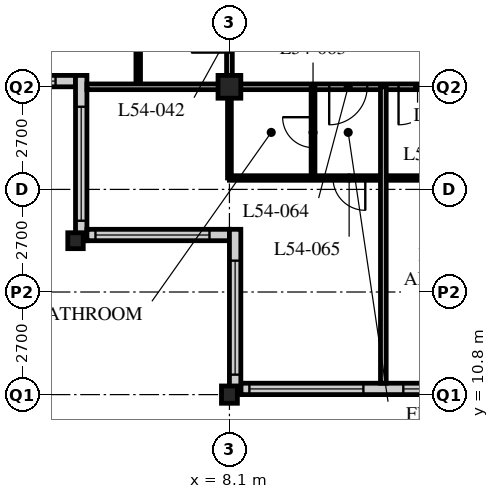
"""IFC4 building model, lengths in metres.
Left out: names, types, materials, properties, quantities, classifications, styles, units other than length and angle.
Written with IfcOpenShell. Run it as: python <this file> out.ifc"""

import sys

from ifc_helpers import new_model, si_unit, direction, frame, frame_2d, origin, origin_2d, place, context, subcontext, project, spatial, rectangle, hollow_rectangle, i_section, extrude, element, fill, save


model = new_model("IFC4")
c1 = context("Model", 3, precision=1e-05, world=origin(), true_north=direction((0.0, 1.0)))
c2 = subcontext(c1, "Body", "Model", "MODEL_VIEW")
j1 = project(units=[si_unit("LENGTHUNIT", "METRE"), si_unit("PLANEANGLEUNIT", "RADIAN")], contexts=[c1])
p1 = place(None, origin())
s1 = spatial("IfcSite", under=j1, at=p1, CompositionType="ELEMENT")
p2 = place(p1, origin())
s2 = spatial("IfcBuilding", under=s1, at=p2, CompositionType="ELEMENT")
p3 = place(p2, frame((0.0, 0.0, 210.0)))
s3 = spatial("IfcBuildingStorey", under=s2, at=p3, CompositionType="ELEMENT", Elevation=210.0)
p4 = place(p3, frame((4.05, 14.85, 0.0), z_axis=(0.0, 0.0, 1.0), x_axis=(1.0, 0.0, 0.0)))
e1 = element("IfcColumn", 1, at=p4, inside=s3, PredefinedType="COLUMN", context=c2, shape_type="SweptSolid", body=[
    extrude(i_section(OverallWidth=0.407, OverallDepth=0.419, WebThickness=0.031, FlangeThickness=0.049, FilletRadius=0.015, at=origin_2d()), origin(), (0.0, 0.0, 1.0), 3.6),
])
p5 = place(p3, frame((8.1, 10.8, 0.0), z_axis=(0.0, 0.0, 1.0), x_axis=(1.0, 0.0, 0.0)))
e2 = element("IfcColumn", 2, at=p5, inside=s3, PredefinedType="COLUMN", context=c2, shape_type="SweptSolid", body=[
    extrude(i_section(OverallWidth=0.418, OverallDepth=0.456, WebThickness=0.042, FlangeThickness=0.067, FilletRadius=0.015, at=origin_2d()), origin(), (0.0, 0.0, 1.0), 3.6),
])
p6 = place(p3, frame((8.1, 18.9, 0.0), z_axis=(0.0, 0.0, 1.0), x_axis=(1.0, 0.0, 0.0)))
e3 = element("IfcColumn", 3, at=p6, inside=s3, PredefinedType="COLUMN", context=c2, shape_type="SweptSolid", body=[
    extrude(hollow_rectangle(XDim=0.6, YDim=0.6, WallThickness=0.05, at=origin_2d()), origin(), (0.0, 0.0, 1.0), 3.6),
])
p7 = place(p3, frame((8.4, 10.95, 0.0), z_axis=(0.0, 0.0, 1.0), x_axis=(1.0, 0.0, 0.0)))
e4 = element("IfcWall", 4, at=p7, inside=s3, PredefinedType="SOLIDWALL", context=c2, shape_type="SweptSolid", body=[
    extrude(rectangle(XDim=40.2, YDim=0.3, at=frame_2d((20.1, 0.0))), origin(), (0.0, 0.0, 1.0), 3.39),
])
p8 = place(p7, frame((0.225, 0.0, 0.6)))
e5 = element("IfcOpeningElement", 5, at=p8, cuts=e4, PredefinedType="OPENING", context=c2, shape_type="SweptSolid", body=[
    extrude(rectangle(XDim=3.0, YDim=2.4, at=frame_2d((1.5, 1.2))), frame((0.0, 0.16, 0.0), z_axis=(0.0, -1.0, 0.0), x_axis=(1.0, 0.0, 0.0)), (0.0, 0.0, 1.0), 0.32),
])
p9 = place(p7, frame((4.275, 0.0, 0.6)))
e6 = element("IfcOpeningElement", 6, at=p9, cuts=e4, PredefinedType="OPENING", context=c2, shape_type="SweptSolid", body=[
    extrude(rectangle(XDim=3.0, YDim=2.4, at=frame_2d((1.5, 1.2))), frame((0.0, 0.16, 0.0), z_axis=(0.0, -1.0, 0.0), x_axis=(1.0, 0.0, 0.0)), (0.0, 0.0, 1.0), 0.32),
])
p10 = place(p7, frame((8.325, 0.0, 0.6)))
e7 = element("IfcOpeningElement", 7, at=p10, cuts=e4, PredefinedType="OPENING", context=c2, shape_type="SweptSolid", body=[
    extrude(rectangle(XDim=3.0, YDim=2.4, at=frame_2d((1.5, 1.2))), frame((0.0, 0.16, 0.0), z_axis=(0.0, -1.0, 0.0), x_axis=(1.0, 0.0, 0.0)), (0.0, 0.0, 1.0), 0.32),
])
p11 = place(p7, frame((12.375, 0.0, 0.6)))
e8 = element("IfcOpeningElement", 8, at=p11, cuts=e4, PredefinedType="OPENING", context=c2, shape_type="SweptSolid", body=[
    extrude(rectangle(XDim=3.0, YDim=2.4, at=frame_2d((1.5, 1.2))), frame((0.0, 0.16, 0.0), z_axis=(0.0, -1.0, 0.0), x_axis=(1.0, 0.0, 0.0)), (0.0, 0.0, 1.0), 0.32),
])
p12 = place(p7, frame((16.425, 0.0, 0.6)))
e9 = element("IfcOpeningElement", 9, at=p12, cuts=e4, PredefinedType="OPENING", context=c2, shape_type="SweptSolid", body=[
    extrude(rectangle(XDim=3.0, YDim=2.4, at=frame_2d((1.5, 1.2))), frame((0.0, 0.16, 0.0), z_axis=(0.0, -1.0, 0.0), x_axis=(1.0, 0.0, 0.0)), (0.0, 0.0, 1.0), 0.32),
])
p13 = place(p7, frame((20.475, 0.0, 0.6)))
e10 = element("IfcOpeningElement", 10, at=p13, cuts=e4, PredefinedType="OPENING", context=c2, shape_type="SweptSolid", body=[
    extrude(rectangle(XDim=3.0, YDim=2.4, at=frame_2d((1.5, 1.2))), frame((0.0, 0.16, 0.0), z_axis=(0.0, -1.0, 0.0), x_axis=(1.0, 0.0, 0.0)), (0.0, 0.0, 1.0), 0.32),
])
p14 = place(p7, frame((24.525, 0.0, 0.6)))
e11 = element("IfcOpeningElement", 11, at=p14, cuts=e4, PredefinedType="OPENING", context=c2, shape_type="SweptSolid", body=[
    extrude(rectangle(XDim=3.0, YDim=2.4, at=frame_2d((1.5, 1.2))), frame((0.0, 0.16, 0.0), z_axis=(0.0, -1.0, 0.0), x_axis=(1.0, 0.0, 0.0)), (0.0, 0.0, 1.0), 0.32),
])
p15 = place(p7, frame((28.575, 0.0, 0.6)))
e12 = element("IfcOpeningElement", 12, at=p15, cuts=e4, PredefinedType="OPENING", context=c2, shape_type="SweptSolid", body=[
    extrude(rectangle(XDim=3.0, YDim=2.4, at=frame_2d((1.5, 1.2))), frame((0.0, 0.16, 0.0), z_axis=(0.0, -1.0, 0.0), x_axis=(1.0, 0.0, 0.0)), (0.0, 0.0, 1.0), 0.32),
])
p16 = place(p7, frame((32.625, 0.0, 0.6)))
e13 = element("IfcOpeningElement", 13, at=p16, cuts=e4, PredefinedType="OPENING", context=c2, shape_type="SweptSolid", body=[
    extrude(rectangle(XDim=3.0, YDim=2.4, at=frame_2d((1.5, 1.2))), frame((0.0, 0.16, 0.0), z_axis=(0.0, -1.0, 0.0), x_axis=(1.0, 0.0, 0.0)), (0.0, 0.0, 1.0), 0.32),
])
p17 = place(p7, frame((36.675, 0.0, 0.6)))
e14 = element("IfcOpeningElement", 14, at=p17, cuts=e4, PredefinedType="OPENING", context=c2, shape_type="SweptSolid", body=[
    extrude(rectangle(XDim=3.0, YDim=2.4, at=frame_2d((1.5, 1.2))), frame((0.0, 0.16, 0.0), z_axis=(0.0, -1.0, 0.0), x_axis=(1.0, 0.0, 0.0)), (0.0, 0.0, 1.0), 0.32),
])
p18 = place(p3, frame((0.3, 19.05, 0.0), z_axis=(0.0, 0.0, 1.0), x_axis=(1.0, 0.0, 0.0)))
e15 = element("IfcWall", 15, at=p18, inside=s3, PredefinedType="SOLIDWALL", context=c2, shape_type="SweptSolid", body=[
    extrude(rectangle(XDim=3.75, YDim=0.3, at=frame_2d((1.875, 0.0))), origin(), (0.0, 0.0, 1.0), 3.39),
])
p19 = place(p18, frame((0.225, 0.0, 0.6)))
e16 = element("IfcOpeningElement", 16, at=p19, cuts=e15, PredefinedType="OPENING", context=c2, shape_type="SweptSolid", body=[
    extrude(rectangle(XDim=3.0, YDim=2.0, at=frame_2d((1.5, 1.0))), frame((0.0, 0.16, 0.0), z_axis=(0.0, -1.0, 0.0), x_axis=(1.0, 0.0, 0.0)), (0.0, 0.0, 1.0), 0.32),
])
p20 = place(p3, frame((4.2, 19.2, 0.0), z_axis=(0.0, 0.0, 1.0), x_axis=(0.0, -1.0, 0.0)))
e17 = element("IfcWall", 17, at=p20, inside=s3, PredefinedType="SOLIDWALL", context=c2, shape_type="SweptSolid", body=[
    extrude(rectangle(XDim=4.35, YDim=0.3, at=frame_2d((2.175, 0.0))), origin(), (0.0, 0.0, 1.0), 3.39),
])
p21 = place(p20, frame((0.825, 0.0, 0.6)))
e18 = element("IfcOpeningElement", 18, at=p21, cuts=e17, PredefinedType="OPENING", context=c2, shape_type="SweptSolid", body=[
    extrude(rectangle(XDim=3.0, YDim=2.0, at=frame_2d((1.5, 1.0))), frame((0.0, 0.16, 0.0), z_axis=(0.0, -1.0, 0.0), x_axis=(1.0, 0.0, 0.0)), (0.0, 0.0, 1.0), 0.32),
])
p22 = place(p3, frame((4.35, 15.0, 0.0), z_axis=(0.0, 0.0, 1.0), x_axis=(1.0, 0.0, 0.0)))
e19 = element("IfcWall", 19, at=p22, inside=s3, PredefinedType="SOLIDWALL", context=c2, shape_type="SweptSolid", body=[
    extrude(rectangle(XDim=3.75, YDim=0.3, at=frame_2d((1.875, 0.0))), origin(), (0.0, 0.0, 1.0), 3.39),
])
p23 = place(p22, frame((0.225, 0.0, 0.6)))
e20 = element("IfcOpeningElement", 20, at=p23, cuts=e19, PredefinedType="OPENING", context=c2, shape_type="SweptSolid", body=[
    extrude(rectangle(XDim=3.0, YDim=2.0, at=frame_2d((1.5, 1.0))), frame((0.0, 0.16, 0.0), z_axis=(0.0, -1.0, 0.0), x_axis=(1.0, 0.0, 0.0)), (0.0, 0.0, 1.0), 0.32),
])
p24 = place(p3, frame((8.25, 15.15, 0.0), z_axis=(0.0, 0.0, 1.0), x_axis=(0.0, -1.0, 0.0)))
e21 = element("IfcWall", 21, at=p24, inside=s3, PredefinedType="SOLIDWALL", context=c2, shape_type="SweptSolid", body=[
    extrude(rectangle(XDim=4.35, YDim=0.3, at=frame_2d((2.175, 0.0))), origin(), (0.0, 0.0, 1.0), 3.39),
])
p25 = place(p24, frame((0.825, 0.0, 0.6)))
e22 = element("IfcOpeningElement", 22, at=p25, cuts=e21, PredefinedType="OPENING", context=c2, shape_type="SweptSolid", body=[
    extrude(rectangle(XDim=3.0, YDim=2.0, at=frame_2d((1.5, 1.0))), frame((0.0, 0.16, 0.0), z_axis=(0.0, -1.0, 0.0), x_axis=(1.0, 0.0, 0.0)), (0.0, 0.0, 1.0), 0.32),
])
p26 = place(p3, frame((8.1, 18.9, 0.0), z_axis=(0.0, 0.0, 1.0), x_axis=(1.0, 0.0, 0.0)))
e23 = element("IfcWall", 23, at=p26, inside=s3, PredefinedType="PARTITIONING", context=c2, shape_type="SweptSolid", body=[
    extrude(rectangle(XDim=36.45, YDim=0.15, at=frame_2d((18.225, 0.0))), origin(), (0.0, 0.0, 1.0), 2.778),
])
p27 = place(p26, frame((4.45, 0.0, 0.0)))
e24 = element("IfcOpeningElement", 24, at=p27, cuts=e23, PredefinedType="OPENING", context=c2, shape_type="SweptSolid", body=[
    extrude(rectangle(XDim=1.0, YDim=2.1, at=frame_2d((0.5, 1.05))), frame((0.0, 0.085, 0.0), z_axis=(0.0, -1.0, 0.0), x_axis=(1.0, 0.0, 0.0)), (0.0, 0.0, 1.0), 0.17),
])
p28 = place(p26, frame((12.55, 0.0, 0.0)))
e25 = element("IfcOpeningElement", 25, at=p28, cuts=e23, PredefinedType="OPENING", context=c2, shape_type="SweptSolid", body=[
    extrude(rectangle(XDim=1.0, YDim=2.1, at=frame_2d((0.5, 1.05))), frame((0.0, 0.085, 0.0), z_axis=(0.0, -1.0, 0.0), x_axis=(1.0, 0.0, 0.0)), (0.0, 0.0, 1.0), 0.17),
])
p29 = place(p26, frame((29.05, 0.0, 0.0)))
e26 = element("IfcOpeningElement", 26, at=p29, cuts=e23, PredefinedType="OPENING", context=c2, shape_type="SweptSolid", body=[
    extrude(rectangle(XDim=1.0, YDim=2.1, at=frame_2d((0.5, 1.05))), frame((0.0, 0.085, 0.0), z_axis=(0.0, -1.0, 0.0), x_axis=(1.0, 0.0, 0.0)), (0.0, 0.0, 1.0), 0.17),
])
p30 = place(p26, frame((2.625, 0.0, 0.0)))
e27 = element("IfcOpeningElement", 27, at=p30, cuts=e23, PredefinedType="OPENING", context=c2, shape_type="SweptSolid", body=[
    extrude(rectangle(XDim=1.0, YDim=2.1, at=frame_2d((0.5, 1.05))), frame((0.0, 0.085, 0.0), z_axis=(0.0, -1.0, 0.0), x_axis=(1.0, 0.0, 0.0)), (0.0, 0.0, 1.0), 0.17),
])
p31 = place(p26, frame((33.925, 0.0, 0.0)))
e28 = element("IfcOpeningElement", 28, at=p31, cuts=e23, PredefinedType="OPENING", context=c2, shape_type="SweptSolid", body=[
    extrude(rectangle(XDim=1.0, YDim=2.1, at=frame_2d((0.5, 1.05))), frame((0.0, 0.085, 0.0), z_axis=(0.0, -1.0, 0.0), x_axis=(1.0, 0.0, 0.0)), (0.0, 0.0, 1.0), 0.17),
])
p32 = place(p3, frame((8.1, 18.9, 0.0), z_axis=(0.0, 0.0, 1.0), x_axis=(0.0, 1.0, 0.0)))
e29 = element("IfcWall", 29, at=p32, inside=s3, PredefinedType="PARTITIONING", context=c2, shape_type="SweptSolid", body=[
    extrude(rectangle(XDim=28.35, YDim=0.15, at=frame_2d((14.175, 0.0))), origin(), (0.0, 0.0, 1.0), 2.778),
])
p33 = place(p32, frame((0.9, 0.0, 0.0)))
e30 = element("IfcOpeningElement", 30, at=p33, cuts=e29, PredefinedType="OPENING", context=c2, shape_type="SweptSolid", body=[
    extrude(rectangle(XDim=1.0, YDim=2.1, at=frame_2d((0.5, 1.05))), frame((0.0, 0.085, 0.0), z_axis=(0.0, -1.0, 0.0), x_axis=(1.0, 0.0, 0.0)), (0.0, 0.0, 1.0), 0.17),
])
p34 = place(p32, frame((17.1, 0.0, 0.0)))
e31 = element("IfcOpeningElement", 31, at=p34, cuts=e29, PredefinedType="OPENING", context=c2, shape_type="SweptSolid", body=[
    extrude(rectangle(XDim=1.0, YDim=2.1, at=frame_2d((0.5, 1.05))), frame((0.0, 0.085, 0.0), z_axis=(0.0, -1.0, 0.0), x_axis=(1.0, 0.0, 0.0)), (0.0, 0.0, 1.0), 0.17),
])
p35 = place(p32, frame((26.65, 0.0, 0.0)))
e32 = element("IfcOpeningElement", 32, at=p35, cuts=e29, PredefinedType="OPENING", context=c2, shape_type="SweptSolid", body=[
    extrude(rectangle(XDim=1.0, YDim=2.1, at=frame_2d((0.5, 1.05))), frame((0.0, 0.085, 0.0), z_axis=(0.0, -1.0, 0.0), x_axis=(1.0, 0.0, 0.0)), (0.0, 0.0, 1.0), 0.17),
])
p36 = place(p3, frame((5.7, 18.9, 0.0), z_axis=(0.0, 0.0, 1.0), x_axis=(0.0, 1.0, 0.0)))
e33 = element("IfcWall", 33, at=p36, inside=s3, PredefinedType="PARTITIONING", context=c2, shape_type="SweptSolid", body=[
    extrude(rectangle(XDim=24.3, YDim=0.12, at=frame_2d((12.15, 0.0))), origin(), (0.0, 0.0, 1.0), 3.39),
])
p37 = place(p36, frame((0.975, 0.0, 0.0)))
e34 = element("IfcOpeningElement", 34, at=p37, cuts=e33, PredefinedType="OPENING", context=c2, shape_type="SweptSolid", body=[
    extrude(rectangle(XDim=0.85, YDim=2.1, at=frame_2d((0.425, 1.05))), frame((0.0, 0.07, 0.0), z_axis=(0.0, -1.0, 0.0), x_axis=(1.0, 0.0, 0.0)), (0.0, 0.0, 1.0), 0.14),
])
p38 = place(p36, frame((8.425, 0.0, 0.0)))
e35 = element("IfcOpeningElement", 35, at=p38, cuts=e33, PredefinedType="OPENING", context=c2, shape_type="SweptSolid", body=[
    extrude(rectangle(XDim=0.85, YDim=2.1, at=frame_2d((0.425, 1.05))), frame((0.0, 0.07, 0.0), z_axis=(0.0, -1.0, 0.0), x_axis=(1.0, 0.0, 0.0)), (0.0, 0.0, 1.0), 0.14),
])
p39 = place(p36, frame((12.475, 0.0, 0.0)))
e36 = element("IfcOpeningElement", 36, at=p39, cuts=e33, PredefinedType="OPENING", context=c2, shape_type="SweptSolid", body=[
    extrude(rectangle(XDim=0.85, YDim=2.1, at=frame_2d((0.425, 1.05))), frame((0.0, 0.07, 0.0), z_axis=(0.0, -1.0, 0.0), x_axis=(1.0, 0.0, 0.0)), (0.0, 0.0, 1.0), 0.14),
])
p40 = place(p36, frame((17.175, 0.0, 0.0)))
e37 = element("IfcOpeningElement", 37, at=p40, cuts=e33, PredefinedType="OPENING", context=c2, shape_type="SweptSolid", body=[
    extrude(rectangle(XDim=0.85, YDim=2.1, at=frame_2d((0.425, 1.05))), frame((0.0, 0.07, 0.0), z_axis=(0.0, -1.0, 0.0), x_axis=(1.0, 0.0, 0.0)), (0.0, 0.0, 1.0), 0.14),
])
p41 = place(p36, frame((20.575, 0.0, 0.0)))
e38 = element("IfcOpeningElement", 38, at=p41, cuts=e33, PredefinedType="OPENING", context=c2, shape_type="SweptSolid", body=[
    extrude(rectangle(XDim=0.85, YDim=2.1, at=frame_2d((0.425, 1.05))), frame((0.0, 0.07, 0.0), z_axis=(0.0, -1.0, 0.0), x_axis=(1.0, 0.0, 0.0)), (0.0, 0.0, 1.0), 0.14),
])
p42 = place(p3, frame((8.1, 16.5, 0.0), z_axis=(0.0, 0.0, 1.0), x_axis=(1.0, 0.0, 0.0)))
e39 = element("IfcWall", 39, at=p42, inside=s3, PredefinedType="PARTITIONING", context=c2, shape_type="SweptSolid", body=[
    extrude(rectangle(XDim=28.35, YDim=0.12, at=frame_2d((14.175, 0.0))), origin(), (0.0, 0.0, 1.0), 3.39),
])
p43 = place(p42, frame((5.025, 0.0, 0.0)))
e40 = element("IfcOpeningElement", 40, at=p43, cuts=e39, PredefinedType="OPENING", context=c2, shape_type="SweptSolid", body=[
    extrude(rectangle(XDim=0.85, YDim=2.1, at=frame_2d((0.425, 1.05))), frame((0.0, 0.07, 0.0), z_axis=(0.0, -1.0, 0.0), x_axis=(1.0, 0.0, 0.0)), (0.0, 0.0, 1.0), 0.14),
])
p44 = place(p42, frame((8.425, 0.0, 0.0)))
e41 = element("IfcOpeningElement", 41, at=p44, cuts=e39, PredefinedType="OPENING", context=c2, shape_type="SweptSolid", body=[
    extrude(rectangle(XDim=0.85, YDim=2.1, at=frame_2d((0.425, 1.05))), frame((0.0, 0.07, 0.0), z_axis=(0.0, -1.0, 0.0), x_axis=(1.0, 0.0, 0.0)), (0.0, 0.0, 1.0), 0.14),
])
p45 = place(p42, frame((13.125, 0.0, 0.0)))
e42 = element("IfcOpeningElement", 42, at=p45, cuts=e39, PredefinedType="OPENING", context=c2, shape_type="SweptSolid", body=[
    extrude(rectangle(XDim=0.85, YDim=2.1, at=frame_2d((0.425, 1.05))), frame((0.0, 0.07, 0.0), z_axis=(0.0, -1.0, 0.0), x_axis=(1.0, 0.0, 0.0)), (0.0, 0.0, 1.0), 0.14),
])
p46 = place(p42, frame((20.575, 0.0, 0.0)))
e43 = element("IfcOpeningElement", 43, at=p46, cuts=e39, PredefinedType="OPENING", context=c2, shape_type="SweptSolid", body=[
    extrude(rectangle(XDim=0.85, YDim=2.1, at=frame_2d((0.425, 1.05))), frame((0.0, 0.07, 0.0), z_axis=(0.0, -1.0, 0.0), x_axis=(1.0, 0.0, 0.0)), (0.0, 0.0, 1.0), 0.14),
])
p47 = place(p42, frame((24.625, 0.0, 0.0)))
e44 = element("IfcOpeningElement", 44, at=p47, cuts=e39, PredefinedType="OPENING", context=c2, shape_type="SweptSolid", body=[
    extrude(rectangle(XDim=0.85, YDim=2.1, at=frame_2d((0.425, 1.05))), frame((0.0, 0.07, 0.0), z_axis=(0.0, -1.0, 0.0), x_axis=(1.0, 0.0, 0.0)), (0.0, 0.0, 1.0), 0.14),
])
p48 = place(p42, frame((2.725, 0.0, 0.0)))
e45 = element("IfcOpeningElement", 45, at=p48, cuts=e39, PredefinedType="OPENING", context=c2, shape_type="SweptSolid", body=[
    extrude(rectangle(XDim=0.85, YDim=2.1, at=frame_2d((0.425, 1.05))), frame((0.0, 0.07, 0.0), z_axis=(0.0, -1.0, 0.0), x_axis=(1.0, 0.0, 0.0)), (0.0, 0.0, 1.0), 0.14),
])
p49 = place(p3, frame((10.3, 18.9, 0.0), z_axis=(0.0, 0.0, 1.0), x_axis=(0.0, -1.0, 0.0)))
e46 = element("IfcWall", 46, at=p49, inside=s3, PredefinedType="PARTITIONING", context=c2, shape_type="SweptSolid", body=[
    extrude(rectangle(XDim=2.4, YDim=0.1, at=frame_2d((1.2, 0.0))), origin(), (0.0, 0.0, 1.0), 3.39),
])
p50 = place(p49, frame((0.8, 0.0, 0.0)))
e47 = element("IfcOpeningElement", 47, at=p50, cuts=e46, PredefinedType="OPENING", context=c2, shape_type="SweptSolid", body=[
    extrude(rectangle(XDim=0.8, YDim=2.1, at=frame_2d((0.4, 1.05))), frame((0.0, 0.06, 0.0), z_axis=(0.0, -1.0, 0.0), x_axis=(1.0, 0.0, 0.0)), (0.0, 0.0, 1.0), 0.12),
])
p51 = place(p3, frame((8.1, 18.9, 0.0), z_axis=(0.0, 0.0, 1.0), x_axis=(0.0, -1.0, 0.0)))
e48 = element("IfcWall", 48, at=p51, inside=s3, PredefinedType="PARTITIONING", context=c2, shape_type="SweptSolid", body=[
    extrude(rectangle(XDim=2.4, YDim=0.1, at=frame_2d((1.2, 0.0))), origin(), (0.0, 0.0, 1.0), 2.778),
])
p52 = place(p3, frame((4.35, 18.9, 0.0), z_axis=(0.0, 0.0, 1.0), x_axis=(1.0, 0.0, 0.0)))
e49 = element("IfcWall", 49, at=p52, inside=s3, PredefinedType="PARTITIONING", context=c2, shape_type="SweptSolid", body=[
    extrude(rectangle(XDim=3.75, YDim=0.15, at=frame_2d((1.875, 0.0))), origin(), (0.0, 0.0, 1.0), 2.778),
])
p53 = place(p3, frame((12.15, 18.9, 0.0), z_axis=(0.0, 0.0, 1.0), x_axis=(0.0, -1.0, 0.0)))
e50 = element("IfcWall", 50, at=p53, inside=s3, PredefinedType="PARTITIONING", context=c2, shape_type="SweptSolid", body=[
    extrude(rectangle(XDim=7.8, YDim=0.15, at=frame_2d((3.9, 0.0))), origin(), (0.0, 0.0, 1.0), 3.39),
])
p54 = place(p8, origin())
e51 = element("IfcWindow", 51, at=p54, inside=s3, PartitioningType="SINGLE_PANEL", PredefinedType="WINDOW", context=c2, shape_type="SweptSolid", body=[
    extrude(rectangle(XDim=3.0, YDim=2.4, at=frame_2d((1.5, 1.2))), frame((0.0, 0.03, 0.0), z_axis=(0.0, -1.0, 0.0), x_axis=(1.0, 0.0, 0.0)), (0.0, 0.0, 1.0), 0.06),
])
fill(e5, e51)
p55 = place(p9, origin())
e52 = element("IfcWindow", 52, at=p55, inside=s3, PartitioningType="SINGLE_PANEL", PredefinedType="WINDOW", context=c2, shape_type="SweptSolid", body=[
    extrude(rectangle(XDim=3.0, YDim=2.4, at=frame_2d((1.5, 1.2))), frame((0.0, 0.03, 0.0), z_axis=(0.0, -1.0, 0.0), x_axis=(1.0, 0.0, 0.0)), (0.0, 0.0, 1.0), 0.06),
])
fill(e6, e52)
p56 = place(p19, origin())
e53 = element("IfcWindow", 53, at=p56, inside=s3, PartitioningType="SINGLE_PANEL", PredefinedType="WINDOW", context=c2, shape_type="SweptSolid", body=[
    extrude(rectangle(XDim=3.0, YDim=2.0, at=frame_2d((1.5, 1.0))), frame((0.0, 0.03, 0.0), z_axis=(0.0, -1.0, 0.0), x_axis=(1.0, 0.0, 0.0)), (0.0, 0.0, 1.0), 0.06),
])
fill(e16, e53)
p57 = place(p21, origin())
e54 = element("IfcWindow", 54, at=p57, inside=s3, PartitioningType="SINGLE_PANEL", PredefinedType="WINDOW", context=c2, shape_type="SweptSolid", body=[
    extrude(rectangle(XDim=3.0, YDim=2.0, at=frame_2d((1.5, 1.0))), frame((0.0, 0.03, 0.0), z_axis=(0.0, -1.0, 0.0), x_axis=(1.0, 0.0, 0.0)), (0.0, 0.0, 1.0), 0.06),
])
fill(e18, e54)
p58 = place(p23, origin())
e55 = element("IfcWindow", 55, at=p58, inside=s3, PartitioningType="SINGLE_PANEL", PredefinedType="WINDOW", context=c2, shape_type="SweptSolid", body=[
    extrude(rectangle(XDim=3.0, YDim=2.0, at=frame_2d((1.5, 1.0))), frame((0.0, 0.03, 0.0), z_axis=(0.0, -1.0, 0.0), x_axis=(1.0, 0.0, 0.0)), (0.0, 0.0, 1.0), 0.06),
])
fill(e20, e55)
p59 = place(p25, origin())
e56 = element("IfcWindow", 56, at=p59, inside=s3, PartitioningType="SINGLE_PANEL", PredefinedType="WINDOW", context=c2, shape_type="SweptSolid", body=[
    extrude(rectangle(XDim=3.0, YDim=2.0, at=frame_2d((1.5, 1.0))), frame((0.0, 0.03, 0.0), z_axis=(0.0, -1.0, 0.0), x_axis=(1.0, 0.0, 0.0)), (0.0, 0.0, 1.0), 0.06),
])
fill(e22, e56)
p60 = place(p27, origin())
e57 = element("IfcDoor", 57, at=p60, inside=s3, OperationType="SINGLE_SWING_RIGHT", PredefinedType="DOOR", context=c2, shape_type="SweptSolid", body=[
    extrude(rectangle(XDim=1.0, YDim=2.1, at=frame_2d((0.5, 1.05))), frame((0.0, 0.025, 0.0), z_axis=(0.0, -1.0, 0.0), x_axis=(1.0, 0.0, 0.0)), (0.0, 0.0, 1.0), 0.05),
])
fill(e24, e57)
p61 = place(p33, origin())
e58 = element("IfcDoor", 58, at=p61, inside=s3, OperationType="SINGLE_SWING_LEFT", PredefinedType="DOOR", context=c2, shape_type="SweptSolid", body=[
    extrude(rectangle(XDim=1.0, YDim=2.1, at=frame_2d((0.5, 1.05))), frame((0.0, 0.025, 0.0), z_axis=(0.0, -1.0, 0.0), x_axis=(1.0, 0.0, 0.0)), (0.0, 0.0, 1.0), 0.05),
])
fill(e30, e58)
p62 = place(p50, origin())
e59 = element("IfcDoor", 59, at=p62, inside=s3, OperationType="SINGLE_SWING_RIGHT", PredefinedType="DOOR", context=c2, shape_type="SweptSolid", body=[
    extrude(rectangle(XDim=0.8, YDim=2.1, at=frame_2d((0.4, 1.05))), frame((0.0, 0.025, 0.0), z_axis=(0.0, -1.0, 0.0), x_axis=(1.0, 0.0, 0.0)), (0.0, 0.0, 1.0), 0.05),
])
fill(e47, e59)
p63 = place(p30, origin())
e60 = element("IfcDoor", 60, at=p63, inside=s3, OperationType="SINGLE_SWING_RIGHT", PredefinedType="DOOR", context=c2, shape_type="SweptSolid", body=[
    extrude(rectangle(XDim=1.0, YDim=2.1, at=frame_2d((0.5, 1.05))), frame((0.0, 0.025, 0.0), z_axis=(0.0, -1.0, 0.0), x_axis=(1.0, 0.0, 0.0)), (0.0, 0.0, 1.0), 0.05),
])
fill(e27, e60)
p64 = place(p48, origin())
e61 = element("IfcDoor", 61, at=p64, inside=s3, OperationType="SINGLE_SWING_LEFT", PredefinedType="DOOR", context=c2, shape_type="SweptSolid", body=[
    extrude(rectangle(XDim=0.85, YDim=2.1, at=frame_2d((0.425, 1.05))), frame((0.0, 0.025, 0.0), z_axis=(0.0, -1.0, 0.0), x_axis=(1.0, 0.0, 0.0)), (0.0, 0.0, 1.0), 0.05),
])
fill(e45, e61)
save(model, sys.argv[1])
